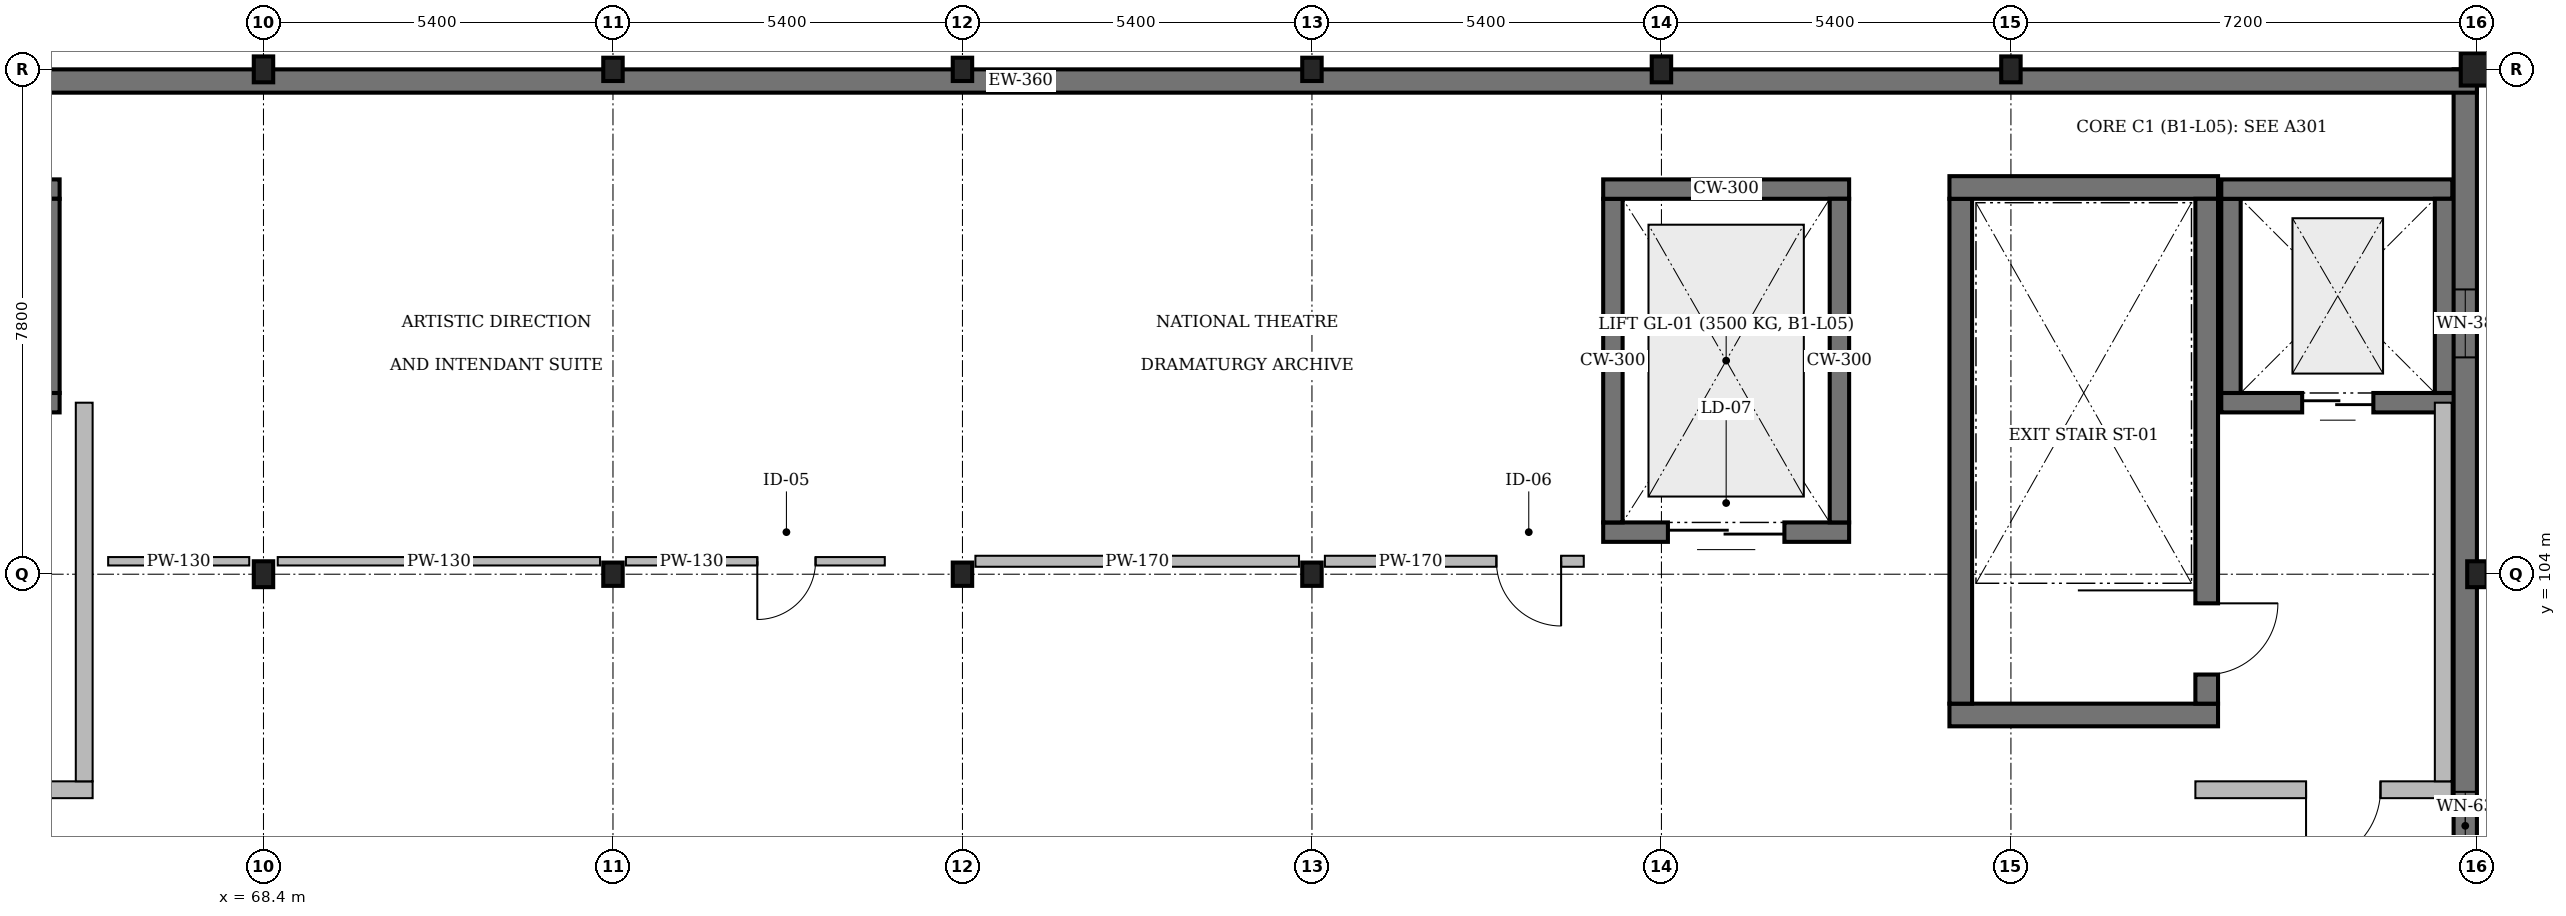
"""IFC4 building model, lengths in metres.
Left out: names, types, materials, properties, quantities, classifications, styles, units other than length and angle.
Written with IfcOpenShell. Run it as: python <this file> out.ifc"""

import sys

from ifc_helpers import new_model, si_unit, direction, frame, frame_2d, origin, origin_2d, place, context, subcontext, project, spatial, rectangle, i_section, extrude, element, fill, save


model = new_model("IFC4")
c1 = context("Model", 3, precision=1e-05, world=origin(), true_north=direction((0.0, 1.0)))
c2 = subcontext(c1, "Body", "Model", "MODEL_VIEW")
j1 = project(units=[si_unit("LENGTHUNIT", "METRE"), si_unit("PLANEANGLEUNIT", "RADIAN")], contexts=[c1])
p1 = place(None, origin())
s1 = spatial("IfcSite", under=j1, at=p1, CompositionType="ELEMENT")
p2 = place(p1, origin())
s2 = spatial("IfcBuilding", under=s1, at=p2, CompositionType="ELEMENT")
p3 = place(p2, frame((0.0, 0.0, 21.0)))
s3 = spatial("IfcBuildingStorey", under=s2, at=p3, CompositionType="ELEMENT", Elevation=21.0)
for number, where, z_axis, x_axis in (
    (1, (68.4, 104.0, 0.0), (0.0, 0.0, 1.0), (1.0, 0.0, 0.0)),
    (2, (68.4, 111.8, 0.0), (0.0, 0.0, 1.0), (1.0, 0.0, 0.0)),
):
    element("IfcColumn", number, at=place(p3, frame(where, z_axis=z_axis, x_axis=x_axis)), inside=s3, PredefinedType="COLUMN", context=c2, shape_type="SweptSolid", body=[
        extrude(i_section(OverallWidth=0.3, OverallDepth=0.4, WebThickness=0.013, FlangeThickness=0.024, FilletRadius=0.027, at=origin_2d()), origin(), (0.0, 0.0, 1.0), 3.9),
    ])
for number, where, z_axis, x_axis in (
    (3, (73.8, 104.0, 0.0), (0.0, 0.0, 1.0), (1.0, 0.0, 0.0)),
    (4, (73.8, 111.8, 0.0), (0.0, 0.0, 1.0), (1.0, 0.0, 0.0)),
    (5, (79.2, 104.0, 0.0), (0.0, 0.0, 1.0), (1.0, 0.0, 0.0)),
    (6, (79.2, 111.8, 0.0), (0.0, 0.0, 1.0), (1.0, 0.0, 0.0)),
    (7, (84.6, 104.0, 0.0), (0.0, 0.0, 1.0), (1.0, 0.0, 0.0)),
    (8, (84.6, 111.8, 0.0), (0.0, 0.0, 1.0), (1.0, 0.0, 0.0)),
):
    element("IfcColumn", number, at=place(p3, frame(where, z_axis=z_axis, x_axis=x_axis)), inside=s3, PredefinedType="COLUMN", context=c2, shape_type="SweptSolid", body=[
        extrude(i_section(OverallWidth=0.3, OverallDepth=0.36, WebThickness=0.012, FlangeThickness=0.022, FilletRadius=0.027, at=origin_2d()), origin(), (0.0, 0.0, 1.0), 3.9),
    ])
for number, where, z_axis, x_axis in (
    (9, (90.0, 111.8, 0.0), (0.0, 0.0, 1.0), (1.0, 0.0, 0.0)),
    (10, (95.4, 111.8, 0.0), (0.0, 0.0, 1.0), (1.0, 0.0, 0.0)),
    (11, (102.6, 104.0, 0.0), (0.0, 0.0, 1.0), (1.0, 0.0, 0.0)),
):
    element("IfcColumn", number, at=place(p3, frame(where, z_axis=z_axis, x_axis=x_axis)), inside=s3, PredefinedType="COLUMN", context=c2, shape_type="SweptSolid", body=[
        extrude(i_section(OverallWidth=0.3, OverallDepth=0.4, WebThickness=0.013, FlangeThickness=0.024, FilletRadius=0.027, at=origin_2d()), origin(), (0.0, 0.0, 1.0), 3.9),
    ])
p4 = place(p3, frame((102.6, 111.8, 0.0), z_axis=(0.0, 0.0, 1.0), x_axis=(1.0, 0.0, 0.0)))
e12 = element("IfcColumn", 12, at=p4, inside=s3, PredefinedType="COLUMN", context=c2, shape_type="SweptSolid", body=[
    extrude(rectangle(XDim=0.5, YDim=0.5, at=origin_2d()), origin(), (0.0, 0.0, 1.0), 3.9),
])
p5 = place(p3, frame((98.6, 101.825, 0.0), z_axis=(0.0, 0.0, 1.0), x_axis=(-1.0, 0.0, 0.0)))
e13 = element("IfcWall", 13, at=p5, inside=s3, PredefinedType="SOLIDWALL", context=c2, shape_type="SweptSolid", body=[
    extrude(rectangle(XDim=4.15, YDim=0.35, at=frame_2d((2.075, 0.0))), origin(), (0.0, 0.0, 1.0), 3.75),
])
p6 = place(p3, frame((94.625, 102.0, 0.0), z_axis=(0.0, 0.0, 1.0), x_axis=(0.0, 1.0, 0.0)))
e14 = element("IfcWall", 14, at=p6, inside=s3, PredefinedType="SOLIDWALL", context=c2, shape_type="SweptSolid", body=[
    extrude(rectangle(XDim=7.8, YDim=0.35, at=frame_2d((3.9, 0.0))), origin(), (0.0, 0.0, 1.0), 3.75),
])
p7 = place(p3, frame((94.45, 109.975, 0.0), z_axis=(0.0, 0.0, 1.0), x_axis=(1.0, 0.0, 0.0)))
e15 = element("IfcWall", 15, at=p7, inside=s3, PredefinedType="SOLIDWALL", context=c2, shape_type="SweptSolid", body=[
    extrude(rectangle(XDim=4.15, YDim=0.35, at=frame_2d((2.075, 0.0))), origin(), (0.0, 0.0, 1.0), 3.75),
])
p8 = place(p3, frame((98.425, 109.8, 0.0), z_axis=(0.0, 0.0, 1.0), x_axis=(0.0, -1.0, 0.0)))
e16 = element("IfcWall", 16, at=p8, inside=s3, PredefinedType="SOLIDWALL", context=c2, shape_type="SweptSolid", body=[
    extrude(rectangle(XDim=7.8, YDim=0.35, at=frame_2d((3.9, 0.0))), origin(), (0.0, 0.0, 1.0), 3.75),
])
p9 = place(p8, frame((6.25, 0.0, 0.0)))
e17 = element("IfcOpeningElement", 17, at=p9, cuts=e16, PredefinedType="OPENING", context=c2, shape_type="SweptSolid", body=[
    extrude(rectangle(XDim=1.1, YDim=2.15, at=frame_2d((0.55, 1.075))), frame((0.0, 0.195, 0.0), z_axis=(0.0, -1.0, 0.0), x_axis=(1.0, 0.0, 0.0)), (0.0, 0.0, 1.0), 0.39),
])
p10 = place(p3, frame((102.25, 106.65, 0.0), z_axis=(0.0, 0.0, 1.0), x_axis=(-1.0, 0.0, 0.0)))
e18 = element("IfcWall", 18, at=p10, inside=s3, PredefinedType="SOLIDWALL", context=c2, shape_type="SweptSolid", body=[
    extrude(rectangle(XDim=3.6, YDim=0.3, at=frame_2d((1.8, 0.0))), origin(), (0.0, 0.0, 1.0), 3.75),
])
p11 = place(p10, frame((1.25, 0.0, 0.0)))
e19 = element("IfcOpeningElement", 19, at=p11, cuts=e18, PredefinedType="OPENING", context=c2, shape_type="SweptSolid", body=[
    extrude(rectangle(XDim=1.1, YDim=2.1, at=frame_2d((0.55, 1.05))), frame((0.0, 0.17, 0.0), z_axis=(0.0, -1.0, 0.0), x_axis=(1.0, 0.0, 0.0)), (0.0, 0.0, 1.0), 0.34),
])
p12 = place(p3, frame((98.8, 106.8, 0.0), z_axis=(0.0, 0.0, 1.0), x_axis=(0.0, 1.0, 0.0)))
e20 = element("IfcWall", 20, at=p12, inside=s3, PredefinedType="SOLIDWALL", context=c2, shape_type="SweptSolid", body=[
    extrude(rectangle(XDim=3.0, YDim=0.3, at=frame_2d((1.5, 0.0))), origin(), (0.0, 0.0, 1.0), 3.75),
])
p13 = place(p3, frame((98.65, 109.95, 0.0), z_axis=(0.0, 0.0, 1.0), x_axis=(1.0, 0.0, 0.0)))
e21 = element("IfcWall", 21, at=p13, inside=s3, PredefinedType="SOLIDWALL", context=c2, shape_type="SweptSolid", body=[
    extrude(rectangle(XDim=3.57, YDim=0.3, at=frame_2d((1.785, 0.0))), origin(), (0.0, 0.0, 1.0), 3.75),
])
p14 = place(p3, frame((102.1, 109.8, 0.0), z_axis=(0.0, 0.0, 1.0), x_axis=(0.0, -1.0, 0.0)))
e22 = element("IfcWall", 22, at=p14, inside=s3, PredefinedType="SOLIDWALL", context=c2, shape_type="SweptSolid", body=[
    extrude(rectangle(XDim=3.0, YDim=0.3, at=frame_2d((1.5, 0.0))), origin(), (0.0, 0.0, 1.0), 3.75),
])
p15 = place(p3, frame((102.21, 100.67, 0.0), z_axis=(0.0, 0.0, 1.0), x_axis=(-1.0, 0.0, 0.0)))
e23 = element("IfcWall", 23, at=p15, inside=s3, PredefinedType="SOLIDWALL", context=c2, shape_type="SweptSolid", body=[
    extrude(rectangle(XDim=3.96, YDim=0.26, at=frame_2d((1.98, 0.0))), origin(), (0.0, 0.0, 1.0), 3.66),
])
p16 = place(p15, frame((1.1, 0.0, 0.0)))
e24 = element("IfcOpeningElement", 24, at=p16, cuts=e23, PredefinedType="OPENING", context=c2, shape_type="SweptSolid", body=[
    extrude(rectangle(XDim=1.15, YDim=2.2, at=frame_2d((0.575, 1.1))), frame((0.0, 0.15, 0.0), z_axis=(0.0, -1.0, 0.0), x_axis=(1.0, 0.0, 0.0)), (0.0, 0.0, 1.0), 0.3),
])
p17 = place(p3, frame((102.08, 106.65, 0.0), z_axis=(0.0, 0.0, 1.0), x_axis=(0.0, -1.0, 0.0)))
e25 = element("IfcWall", 25, at=p17, inside=s3, PredefinedType="SOLIDWALL", context=c2, shape_type="SweptSolid", body=[
    extrude(rectangle(XDim=5.85, YDim=0.26, at=frame_2d((2.925, 0.0))), origin(), (0.0, 0.0, 1.0), 3.66),
])
p18 = place(p3, frame((65.25, 106.65, 0.0), z_axis=(0.0, 0.0, 1.0), x_axis=(-1.0, 0.0, 0.0)))
e26 = element("IfcWall", 26, at=p18, inside=s3, PredefinedType="SOLIDWALL", context=c2, shape_type="SweptSolid", body=[
    extrude(rectangle(XDim=2.8, YDim=0.3, at=frame_2d((1.4, 0.0))), origin(), (0.0, 0.0, 1.0), 3.75),
])
p19 = place(p18, frame((0.825, 0.0, 0.0)))
e27 = element("IfcOpeningElement", 27, at=p19, cuts=e26, PredefinedType="OPENING", context=c2, shape_type="SweptSolid", body=[
    extrude(rectangle(XDim=1.15, YDim=2.1, at=frame_2d((0.575, 1.05))), frame((0.0, 0.17, 0.0), z_axis=(0.0, -1.0, 0.0), x_axis=(1.0, 0.0, 0.0)), (0.0, 0.0, 1.0), 0.34),
])
p20 = place(p3, frame((62.45, 109.95, 0.0), z_axis=(0.0, 0.0, 1.0), x_axis=(1.0, 0.0, 0.0)))
e28 = element("IfcWall", 28, at=p20, inside=s3, PredefinedType="SOLIDWALL", context=c2, shape_type="SweptSolid", body=[
    extrude(rectangle(XDim=2.8, YDim=0.3, at=frame_2d((1.4, 0.0))), origin(), (0.0, 0.0, 1.0), 3.75),
])
p21 = place(p3, frame((65.1, 109.8, 0.0), z_axis=(0.0, 0.0, 1.0), x_axis=(0.0, -1.0, 0.0)))
e29 = element("IfcWall", 29, at=p21, inside=s3, PredefinedType="SOLIDWALL", context=c2, shape_type="SweptSolid", body=[
    extrude(rectangle(XDim=3.0, YDim=0.3, at=frame_2d((1.5, 0.0))), origin(), (0.0, 0.0, 1.0), 3.75),
])
p22 = place(p3, frame((65.76, 100.67, 0.0), z_axis=(0.0, 0.0, 1.0), x_axis=(-1.0, 0.0, 0.0)))
e30 = element("IfcWall", 30, at=p22, inside=s3, PredefinedType="SOLIDWALL", context=c2, shape_type="SweptSolid", body=[
    extrude(rectangle(XDim=3.66, YDim=0.26, at=frame_2d((1.83, 0.0))), origin(), (0.0, 0.0, 1.0), 3.66),
])
p23 = place(p22, frame((1.1, 0.0, 0.0)))
e31 = element("IfcOpeningElement", 31, at=p23, cuts=e30, PredefinedType="OPENING", context=c2, shape_type="SweptSolid", body=[
    extrude(rectangle(XDim=1.15, YDim=2.2, at=frame_2d((0.575, 1.1))), frame((0.0, 0.15, 0.0), z_axis=(0.0, -1.0, 0.0), x_axis=(1.0, 0.0, 0.0)), (0.0, 0.0, 1.0), 0.3),
])
p24 = place(p3, frame((65.63, 106.65, 0.0), z_axis=(0.0, 0.0, 1.0), x_axis=(0.0, -1.0, 0.0)))
e32 = element("IfcWall", 32, at=p24, inside=s3, PredefinedType="SOLIDWALL", context=c2, shape_type="SweptSolid", body=[
    extrude(rectangle(XDim=5.85, YDim=0.26, at=frame_2d((2.925, 0.0))), origin(), (0.0, 0.0, 1.0), 3.66),
])
p25 = place(p3, frame((92.9, 104.65, 0.0), z_axis=(0.0, 0.0, 1.0), x_axis=(-1.0, 0.0, 0.0)))
e33 = element("IfcWall", 33, at=p25, inside=s3, PredefinedType="SOLIDWALL", context=c2, shape_type="SweptSolid", body=[
    extrude(rectangle(XDim=3.8, YDim=0.3, at=frame_2d((1.9, 0.0))), origin(), (0.0, 0.0, 1.0), 3.75),
])
p26 = place(p25, frame((1.0, 0.0, 0.0)))
e34 = element("IfcOpeningElement", 34, at=p26, cuts=e33, PredefinedType="OPENING", context=c2, shape_type="SweptSolid", body=[
    extrude(rectangle(XDim=1.8, YDim=2.4, at=frame_2d((0.9, 1.2))), frame((0.0, 0.17, 0.0), z_axis=(0.0, -1.0, 0.0), x_axis=(1.0, 0.0, 0.0)), (0.0, 0.0, 1.0), 0.34),
])
p27 = place(p3, frame((89.25, 104.8, 0.0), z_axis=(0.0, 0.0, 1.0), x_axis=(0.0, 1.0, 0.0)))
e35 = element("IfcWall", 35, at=p27, inside=s3, PredefinedType="SOLIDWALL", context=c2, shape_type="SweptSolid", body=[
    extrude(rectangle(XDim=5.0, YDim=0.3, at=frame_2d((2.5, 0.0))), origin(), (0.0, 0.0, 1.0), 3.75),
])
p28 = place(p3, frame((89.1, 109.95, 0.0), z_axis=(0.0, 0.0, 1.0), x_axis=(1.0, 0.0, 0.0)))
e36 = element("IfcWall", 36, at=p28, inside=s3, PredefinedType="SOLIDWALL", context=c2, shape_type="SweptSolid", body=[
    extrude(rectangle(XDim=3.8, YDim=0.3, at=frame_2d((1.9, 0.0))), origin(), (0.0, 0.0, 1.0), 3.75),
])
p29 = place(p3, frame((92.75, 109.8, 0.0), z_axis=(0.0, 0.0, 1.0), x_axis=(0.0, -1.0, 0.0)))
e37 = element("IfcWall", 37, at=p29, inside=s3, PredefinedType="SOLIDWALL", context=c2, shape_type="SweptSolid", body=[
    extrude(rectangle(XDim=5.0, YDim=0.3, at=frame_2d((2.5, 0.0))), origin(), (0.0, 0.0, 1.0), 3.75),
])
p30 = place(p3, frame((102.42, 87.8, 0.0), z_axis=(0.0, 0.0, 1.0), x_axis=(0.0, 1.0, 0.0)))
e38 = element("IfcWall", 38, at=p30, inside=s3, PredefinedType="SOLIDWALL", context=c2, shape_type="SweptSolid", body=[
    extrude(rectangle(XDim=24.0, YDim=0.36, at=frame_2d((12.0, 0.0))), origin(), (0.0, 0.0, 1.0), 3.65),
])
p31 = place(p30, frame((3.63, 0.0, 0.95)))
e39 = element("IfcOpeningElement", 39, at=p31, cuts=e38, PredefinedType="OPENING", context=c2, shape_type="SweptSolid", body=[
    extrude(rectangle(XDim=1.14, YDim=1.85, at=frame_2d((0.57, 0.925))), frame((0.0, 0.2, 0.0), z_axis=(0.0, -1.0, 0.0), x_axis=(1.0, 0.0, 0.0)), (0.0, 0.0, 1.0), 0.4),
])
p32 = place(p30, frame((11.788, 0.0, 0.95)))
e40 = element("IfcOpeningElement", 40, at=p32, cuts=e38, PredefinedType="OPENING", context=c2, shape_type="SweptSolid", body=[
    extrude(rectangle(XDim=1.05, YDim=1.85, at=frame_2d((0.525, 0.925))), frame((0.0, 0.2, 0.0), z_axis=(0.0, -1.0, 0.0), x_axis=(1.0, 0.0, 0.0)), (0.0, 0.0, 1.0), 0.4),
])
p33 = place(p30, frame((19.55, 0.0, 0.95)))
e41 = element("IfcOpeningElement", 41, at=p33, cuts=e38, PredefinedType="OPENING", context=c2, shape_type="SweptSolid", body=[
    extrude(rectangle(XDim=1.05, YDim=1.6, at=frame_2d((0.525, 0.8))), frame((0.0, 0.2, 0.0), z_axis=(0.0, -1.0, 0.0), x_axis=(1.0, 0.0, 0.0)), (0.0, 0.0, 1.0), 0.4),
])
p34 = place(p3, frame((57.6, 111.62, 0.0), z_axis=(0.0, 0.0, 1.0), x_axis=(1.0, 0.0, 0.0)))
e42 = element("IfcWall", 42, at=p34, inside=s3, PredefinedType="SOLIDWALL", context=c2, shape_type="SweptSolid", body=[
    extrude(rectangle(XDim=45.0, YDim=0.36, at=frame_2d((22.5, 0.0))), origin(), (0.0, 0.0, 1.0), 3.65),
])
p35 = place(p3, frame((78.0, 104.2, 0.0), z_axis=(0.0, 0.0, 1.0), x_axis=(-1.0, 0.0, 0.0)))
e43 = element("IfcWall", 43, at=p35, inside=s3, PredefinedType="PARTITIONING", context=c2, shape_type="SweptSolid", body=[
    extrude(rectangle(XDim=4.0, YDim=0.13, at=frame_2d((2.0, 0.0))), origin(), (0.0, 0.0, 1.0), 3.18),
])
p36 = place(p35, frame((1.07, 0.0, 0.0)))
e44 = element("IfcOpeningElement", 44, at=p36, cuts=e43, PredefinedType="OPENING", context=c2, shape_type="SweptSolid", body=[
    extrude(rectangle(XDim=0.9, YDim=2.15, at=frame_2d((0.45, 1.075))), frame((0.0, 0.085, 0.0), z_axis=(0.0, -1.0, 0.0), x_axis=(1.0, 0.0, 0.0)), (0.0, 0.0, 1.0), 0.17),
])
p37 = place(p3, frame((73.6, 104.2, 0.0), z_axis=(0.0, 0.0, 1.0), x_axis=(-1.0, 0.0, 0.0)))
e45 = element("IfcWall", 45, at=p37, inside=s3, PredefinedType="PARTITIONING", context=c2, shape_type="SweptSolid", body=[
    extrude(rectangle(XDim=4.98, YDim=0.13, at=frame_2d((2.49, 0.0))), origin(), (0.0, 0.0, 1.0), 3.18),
])
p38 = place(p3, frame((68.18, 104.2, 0.0), z_axis=(0.0, 0.0, 1.0), x_axis=(-1.0, 0.0, 0.0)))
e46 = element("IfcWall", 46, at=p38, inside=s3, PredefinedType="PARTITIONING", context=c2, shape_type="SweptSolid", body=[
    extrude(rectangle(XDim=2.18, YDim=0.13, at=frame_2d((1.09, 0.0))), origin(), (0.0, 0.0, 1.0), 3.66),
])
p39 = place(p3, frame((88.8, 104.2, 0.0), z_axis=(0.0, 0.0, 1.0), x_axis=(-1.0, 0.0, 0.0)))
e47 = element("IfcWall", 47, at=p39, inside=s3, PredefinedType="PARTITIONING", context=c2, shape_type="SweptSolid", body=[
    extrude(rectangle(XDim=4.0, YDim=0.17, at=frame_2d((2.0, 0.0))), origin(), (0.0, 0.0, 1.0), 3.66),
])
p40 = place(p39, frame((0.35, 0.0, 0.0)))
e48 = element("IfcOpeningElement", 48, at=p40, cuts=e47, PredefinedType="OPENING", context=c2, shape_type="SweptSolid", body=[
    extrude(rectangle(XDim=1.0, YDim=2.2, at=frame_2d((0.5, 1.1))), frame((0.0, 0.105, 0.0), z_axis=(0.0, -1.0, 0.0), x_axis=(1.0, 0.0, 0.0)), (0.0, 0.0, 1.0), 0.21),
])
p41 = place(p3, frame((84.4, 104.2, 0.0), z_axis=(0.0, 0.0, 1.0), x_axis=(-1.0, 0.0, 0.0)))
e49 = element("IfcWall", 49, at=p41, inside=s3, PredefinedType="PARTITIONING", context=c2, shape_type="SweptSolid", body=[
    extrude(rectangle(XDim=5.0, YDim=0.17, at=frame_2d((2.5, 0.0))), origin(), (0.0, 0.0, 1.0), 3.18),
])
p42 = place(p9, origin())
e50 = element("IfcDoor", 50, at=p42, inside=s3, OperationType="SINGLE_SWING_LEFT", PredefinedType="DOOR", context=c2, shape_type="SweptSolid", body=[
    extrude(rectangle(XDim=1.1, YDim=2.15, at=frame_2d((0.55, 1.075))), frame((0.0, 0.025, 0.0), z_axis=(0.0, -1.0, 0.0), x_axis=(1.0, 0.0, 0.0)), (0.0, 0.0, 1.0), 0.05),
])
fill(e17, e50)
p43 = place(p11, origin())
e51 = element("IfcDoor", 51, at=p43, inside=s3, OperationType="DOUBLE_DOOR_SLIDING", PredefinedType="DOOR", context=c2, shape_type="SweptSolid", body=[
    extrude(rectangle(XDim=1.1, YDim=2.1, at=frame_2d((0.55, 1.05))), frame((0.0, 0.025, 0.0), z_axis=(0.0, -1.0, 0.0), x_axis=(1.0, 0.0, 0.0)), (0.0, 0.0, 1.0), 0.05),
])
fill(e19, e51)
p44 = place(p16, origin())
e52 = element("IfcDoor", 52, at=p44, inside=s3, OperationType="SINGLE_SWING_RIGHT", PredefinedType="DOOR", context=c2, shape_type="SweptSolid", body=[
    extrude(rectangle(XDim=1.15, YDim=2.2, at=frame_2d((0.575, 1.1))), frame((0.0, 0.025, 0.0), z_axis=(0.0, -1.0, 0.0), x_axis=(1.0, 0.0, 0.0)), (0.0, 0.0, 1.0), 0.05),
])
fill(e24, e52)
p45 = place(p26, origin())
e53 = element("IfcDoor", 53, at=p45, inside=s3, OperationType="DOUBLE_DOOR_SLIDING", PredefinedType="DOOR", context=c2, shape_type="SweptSolid", body=[
    extrude(rectangle(XDim=1.8, YDim=2.4, at=frame_2d((0.9, 1.2))), frame((0.0, 0.025, 0.0), z_axis=(0.0, -1.0, 0.0), x_axis=(1.0, 0.0, 0.0)), (0.0, 0.0, 1.0), 0.05),
])
fill(e34, e53)
p46 = place(p32, origin())
e54 = element("IfcWindow", 54, at=p46, inside=s3, PartitioningType="SINGLE_PANEL", PredefinedType="WINDOW", context=c2, shape_type="SweptSolid", body=[
    extrude(rectangle(XDim=1.05, YDim=1.85, at=frame_2d((0.525, 0.925))), frame((0.0, 0.03, 0.0), z_axis=(0.0, -1.0, 0.0), x_axis=(1.0, 0.0, 0.0)), (0.0, 0.0, 1.0), 0.06),
])
fill(e40, e54)
p47 = place(p33, origin())
e55 = element("IfcWindow", 55, at=p47, inside=s3, PartitioningType="SINGLE_PANEL", PredefinedType="WINDOW", context=c2, shape_type="SweptSolid", body=[
    extrude(rectangle(XDim=1.05, YDim=1.6, at=frame_2d((0.525, 0.8))), frame((0.0, 0.03, 0.0), z_axis=(0.0, -1.0, 0.0), x_axis=(1.0, 0.0, 0.0)), (0.0, 0.0, 1.0), 0.06),
])
fill(e41, e55)
p48 = place(p36, origin())
e56 = element("IfcDoor", 56, at=p48, inside=s3, OperationType="SINGLE_SWING_RIGHT", PredefinedType="DOOR", context=c2, shape_type="SweptSolid", body=[
    extrude(rectangle(XDim=0.9, YDim=2.15, at=frame_2d((0.45, 1.075))), frame((0.0, 0.025, 0.0), z_axis=(0.0, -1.0, 0.0), x_axis=(1.0, 0.0, 0.0)), (0.0, 0.0, 1.0), 0.05),
])
fill(e44, e56)
p49 = place(p40, origin())
e57 = element("IfcDoor", 57, at=p49, inside=s3, OperationType="SINGLE_SWING_LEFT", PredefinedType="DOOR", context=c2, shape_type="SweptSolid", body=[
    extrude(rectangle(XDim=1.0, YDim=2.2, at=frame_2d((0.5, 1.1))), frame((0.0, 0.025, 0.0), z_axis=(0.0, -1.0, 0.0), x_axis=(1.0, 0.0, 0.0)), (0.0, 0.0, 1.0), 0.05),
])
fill(e48, e57)
save(model, sys.argv[1])
